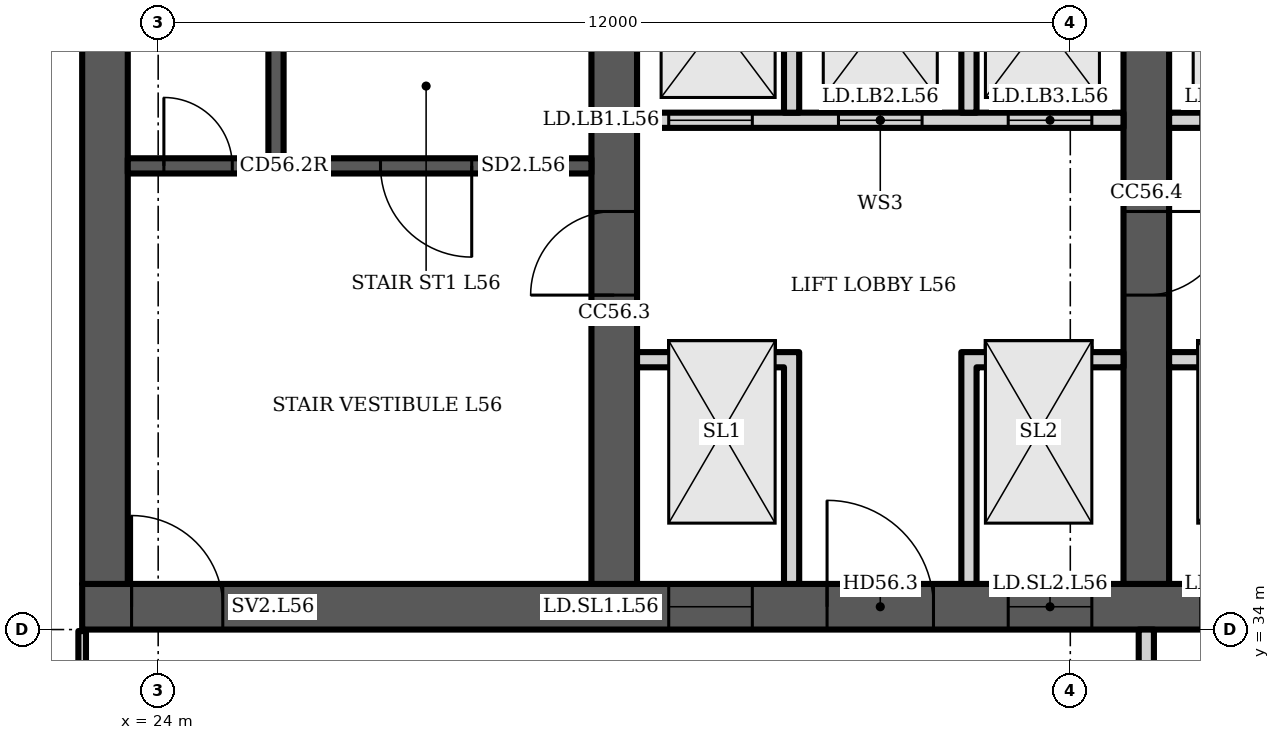
"""IFC4 building model, lengths in metres.
Left out: names, types, materials, properties, quantities, classifications, styles, units other than length and angle.
Written with IfcOpenShell. Run it as: python <this file> out.ifc"""

import sys

from ifc_helpers import new_model, si_unit, direction, frame, frame_2d, origin, place, context, subcontext, project, spatial, polyline, rectangle, outline, extrude, element, fill, save


model = new_model("IFC4")
c1 = context("Model", 3, precision=1e-05, world=origin(), true_north=direction((0.0, 1.0)))
c2 = subcontext(c1, "Body", "Model", "MODEL_VIEW")
j1 = project(units=[si_unit("LENGTHUNIT", "METRE"), si_unit("PLANEANGLEUNIT", "RADIAN")], contexts=[c1])
p1 = place(None, origin())
s1 = spatial("IfcSite", under=j1, at=p1, CompositionType="ELEMENT")
p2 = place(p1, origin())
s2 = spatial("IfcBuilding", under=s1, at=p2, CompositionType="ELEMENT")
p3 = place(p2, frame((0.0, 0.0, 225.1)))
s3 = spatial("IfcBuildingStorey", under=s2, at=p3, CompositionType="ELEMENT", Elevation=225.1)
p4 = place(p3, frame((23.0, 34.3, 0.0), z_axis=(0.0, 0.0, 1.0), x_axis=(1.0, 0.0, 0.0)))
e1 = element("IfcWall", 1, at=p4, inside=s3, PredefinedType="SHEAR", context=c2, shape_type="SweptSolid", body=[
    extrude(rectangle(XDim=35.0, YDim=0.6, at=frame_2d((17.5, 0.0))), origin(), (0.0, 0.0, 1.0), 3.6),
])
p5 = place(p4, frame((0.65, 0.0, 0.0)))
e2 = element("IfcOpeningElement", 2, at=p5, cuts=e1, PredefinedType="OPENING", context=c2, shape_type="SweptSolid", body=[
    extrude(rectangle(XDim=1.2, YDim=2.1, at=frame_2d((0.6, 1.05))), frame((0.0, 0.31, 0.0), z_axis=(0.0, -1.0, 0.0), x_axis=(1.0, 0.0, 0.0)), (0.0, 0.0, 1.0), 0.62),
])
p6 = place(p4, frame((7.717, 0.0, 0.0)))
e3 = element("IfcOpeningElement", 3, at=p6, cuts=e1, PredefinedType="OPENING", context=c2, shape_type="SweptSolid", body=[
    extrude(rectangle(XDim=1.1, YDim=2.1, at=frame_2d((0.55, 1.05))), frame((0.0, 0.31, 0.0), z_axis=(0.0, -1.0, 0.0), x_axis=(1.0, 0.0, 0.0)), (0.0, 0.0, 1.0), 0.62),
])
p7 = place(p4, frame((12.183, 0.0, 0.0)))
e4 = element("IfcOpeningElement", 4, at=p7, cuts=e1, PredefinedType="OPENING", context=c2, shape_type="SweptSolid", body=[
    extrude(rectangle(XDim=1.1, YDim=2.1, at=frame_2d((0.55, 1.05))), frame((0.0, 0.31, 0.0), z_axis=(0.0, -1.0, 0.0), x_axis=(1.0, 0.0, 0.0)), (0.0, 0.0, 1.0), 0.62),
])
p8 = place(p4, frame((9.8, 0.0, 0.0)))
e5 = element("IfcOpeningElement", 5, at=p8, cuts=e1, PredefinedType="OPENING", context=c2, shape_type="SweptSolid", body=[
    extrude(rectangle(XDim=1.4, YDim=2.1, at=frame_2d((0.7, 1.05))), frame((0.0, 0.31, 0.0), z_axis=(0.0, -1.0, 0.0), x_axis=(1.0, 0.0, 0.0)), (0.0, 0.0, 1.0), 0.62),
])
p9 = place(p4, frame((14.717, 0.0, 0.0)))
e6 = element("IfcOpeningElement", 6, at=p9, cuts=e1, PredefinedType="OPENING", context=c2, shape_type="SweptSolid", body=[
    extrude(rectangle(XDim=1.1, YDim=2.1, at=frame_2d((0.55, 1.05))), frame((0.0, 0.31, 0.0), z_axis=(0.0, -1.0, 0.0), x_axis=(1.0, 0.0, 0.0)), (0.0, 0.0, 1.0), 0.62),
])
p10 = place(p4, frame((16.95, 0.0, 0.0)))
e7 = element("IfcOpeningElement", 7, at=p10, cuts=e1, PredefinedType="OPENING", context=c2, shape_type="SweptSolid", body=[
    extrude(rectangle(XDim=1.1, YDim=2.1, at=frame_2d((0.55, 1.05))), frame((0.0, 0.31, 0.0), z_axis=(0.0, -1.0, 0.0), x_axis=(1.0, 0.0, 0.0)), (0.0, 0.0, 1.0), 0.62),
])
p11 = place(p4, frame((19.183, 0.0, 0.0)))
e8 = element("IfcOpeningElement", 8, at=p11, cuts=e1, PredefinedType="OPENING", context=c2, shape_type="SweptSolid", body=[
    extrude(rectangle(XDim=1.1, YDim=2.1, at=frame_2d((0.55, 1.05))), frame((0.0, 0.31, 0.0), z_axis=(0.0, -1.0, 0.0), x_axis=(1.0, 0.0, 0.0)), (0.0, 0.0, 1.0), 0.62),
])
p12 = place(p4, frame((26.15, 0.0, 0.0)))
e9 = element("IfcOpeningElement", 9, at=p12, cuts=e1, PredefinedType="OPENING", context=c2, shape_type="SweptSolid", body=[
    extrude(rectangle(XDim=1.2, YDim=2.1, at=frame_2d((0.6, 1.05))), frame((0.0, 0.31, 0.0), z_axis=(0.0, -1.0, 0.0), x_axis=(1.0, 0.0, 0.0)), (0.0, 0.0, 1.0), 0.62),
])
p13 = place(p4, frame((30.8, 0.0, 0.0)))
e10 = element("IfcOpeningElement", 10, at=p13, cuts=e1, PredefinedType="OPENING", context=c2, shape_type="SweptSolid", body=[
    extrude(rectangle(XDim=1.4, YDim=2.1, at=frame_2d((0.7, 1.05))), frame((0.0, 0.31, 0.0), z_axis=(0.0, -1.0, 0.0), x_axis=(1.0, 0.0, 0.0)), (0.0, 0.0, 1.0), 0.62),
])
p14 = place(p3, frame((23.3, 34.6, 0.0), z_axis=(0.0, 0.0, 1.0), x_axis=(0.0, 1.0, 0.0)))
e11 = element("IfcWall", 11, at=p14, inside=s3, PredefinedType="SHEAR", context=c2, shape_type="SweptSolid", body=[
    extrude(rectangle(XDim=13.585, YDim=0.6, at=frame_2d((6.792, 0.0))), origin(), (0.0, 0.0, 1.0), 3.6),
])
p15 = place(p3, frame((30.0, 34.6, 0.0), z_axis=(0.0, 0.0, 1.0), x_axis=(0.0, 1.0, 0.0)))
e12 = element("IfcWall", 12, at=p15, inside=s3, PredefinedType="SHEAR", context=c2, shape_type="SweptSolid", body=[
    extrude(rectangle(XDim=14.171, YDim=0.6, at=frame_2d((7.085, 0.0))), origin(), (0.0, 0.0, 1.0), 3.6),
])
p16 = place(p15, frame((3.8, 0.0, 0.0)))
e13 = element("IfcOpeningElement", 13, at=p16, cuts=e12, PredefinedType="OPENING", context=c2, shape_type="SweptSolid", body=[
    extrude(rectangle(XDim=1.1, YDim=2.1, at=frame_2d((0.55, 1.05))), frame((0.0, 0.31, 0.0), z_axis=(0.0, -1.0, 0.0), x_axis=(1.0, 0.0, 0.0)), (0.0, 0.0, 1.0), 0.62),
])
p17 = place(p3, frame((37.0, 34.6, 0.0), z_axis=(0.0, 0.0, 1.0), x_axis=(0.0, 1.0, 0.0)))
e14 = element("IfcWall", 14, at=p17, inside=s3, PredefinedType="SHEAR", context=c2, shape_type="SweptSolid", body=[
    extrude(rectangle(XDim=14.784, YDim=0.6, at=frame_2d((7.392, 0.0))), origin(), (0.0, 0.0, 1.0), 3.6),
])
p18 = place(p17, frame((11.302, 0.0, 0.0)))
e15 = element("IfcOpeningElement", 15, at=p18, cuts=e14, PredefinedType="OPENING", context=c2, shape_type="SweptSolid", body=[
    extrude(rectangle(XDim=1.0, YDim=2.1, at=frame_2d((0.5, 1.05))), frame((0.0, 0.31, 0.0), z_axis=(0.0, -1.0, 0.0), x_axis=(1.0, 0.0, 0.0)), (0.0, 0.0, 1.0), 0.62),
])
p19 = place(p17, frame((3.8, 0.0, 0.0)))
e16 = element("IfcOpeningElement", 16, at=p19, cuts=e14, PredefinedType="OPENING", context=c2, shape_type="SweptSolid", body=[
    extrude(rectangle(XDim=1.1, YDim=2.1, at=frame_2d((0.55, 1.05))), frame((0.0, 0.31, 0.0), z_axis=(0.0, -1.0, 0.0), x_axis=(1.0, 0.0, 0.0)), (0.0, 0.0, 1.0), 0.62),
])
p20 = place(p3, frame((23.6, 40.1, 0.0), z_axis=(0.0, 0.0, 1.0), x_axis=(1.0, 0.0, 0.0)))
e17 = element("IfcWall", 17, at=p20, inside=s3, PredefinedType="SHEAR", context=c2, shape_type="SweptSolid", body=[
    extrude(rectangle(XDim=6.1, YDim=0.2, at=frame_2d((3.05, 0.0))), origin(), (0.0, 0.0, 1.0), 3.2),
])
p21 = place(p20, frame((3.325, 0.0, 0.0)))
e18 = element("IfcOpeningElement", 18, at=p21, cuts=e17, PredefinedType="OPENING", context=c2, shape_type="SweptSolid", body=[
    extrude(rectangle(XDim=1.2, YDim=2.1, at=frame_2d((0.6, 1.05))), frame((0.0, 0.11, 0.0), z_axis=(0.0, -1.0, 0.0), x_axis=(1.0, 0.0, 0.0)), (0.0, 0.0, 1.0), 0.22),
])
p22 = place(p20, frame((0.475, 0.0, 0.0)))
e19 = element("IfcOpeningElement", 19, at=p22, cuts=e17, PredefinedType="OPENING", context=c2, shape_type="SweptSolid", body=[
    extrude(rectangle(XDim=0.9, YDim=2.1, at=frame_2d((0.45, 1.05))), frame((0.0, 0.11, 0.0), z_axis=(0.0, -1.0, 0.0), x_axis=(1.0, 0.0, 0.0)), (0.0, 0.0, 1.0), 0.22),
])
p23 = place(p3, frame((25.55, 40.2, 0.0), z_axis=(0.0, 0.0, 1.0), x_axis=(0.0, 1.0, 0.0)))
e20 = element("IfcWall", 20, at=p23, inside=s3, PredefinedType="SHEAR", context=c2, shape_type="SweptSolid", body=[
    extrude(rectangle(XDim=7.2, YDim=0.2, at=frame_2d((3.6, 0.0))), origin(), (0.0, 0.0, 1.0), 3.2),
])
p24 = place(p3, frame((30.3, 40.7, 0.0), z_axis=(0.0, 0.0, 1.0), x_axis=(1.0, 0.0, 0.0)))
e21 = element("IfcWall", 21, at=p24, inside=s3, PredefinedType="PARTITIONING", context=c2, shape_type="SweptSolid", body=[
    extrude(rectangle(XDim=6.4, YDim=0.2, at=frame_2d((3.2, 0.0))), origin(), (0.0, 0.0, 1.0), 3.2),
])
p25 = place(p24, frame((0.417, 0.0, 0.0)))
e22 = element("IfcOpeningElement", 22, at=p25, cuts=e21, PredefinedType="OPENING", context=c2, shape_type="SweptSolid", body=[
    extrude(rectangle(XDim=1.1, YDim=2.1, at=frame_2d((0.55, 1.05))), frame((0.0, 0.11, 0.0), z_axis=(0.0, -1.0, 0.0), x_axis=(1.0, 0.0, 0.0)), (0.0, 0.0, 1.0), 0.22),
])
p26 = place(p24, frame((2.65, 0.0, 0.0)))
e23 = element("IfcOpeningElement", 23, at=p26, cuts=e21, PredefinedType="OPENING", context=c2, shape_type="SweptSolid", body=[
    extrude(rectangle(XDim=1.1, YDim=2.1, at=frame_2d((0.55, 1.05))), frame((0.0, 0.11, 0.0), z_axis=(0.0, -1.0, 0.0), x_axis=(1.0, 0.0, 0.0)), (0.0, 0.0, 1.0), 0.22),
])
p27 = place(p24, frame((4.883, 0.0, 0.0)))
e24 = element("IfcOpeningElement", 24, at=p27, cuts=e21, PredefinedType="OPENING", context=c2, shape_type="SweptSolid", body=[
    extrude(rectangle(XDim=1.1, YDim=2.1, at=frame_2d((0.55, 1.05))), frame((0.0, 0.11, 0.0), z_axis=(0.0, -1.0, 0.0), x_axis=(1.0, 0.0, 0.0)), (0.0, 0.0, 1.0), 0.22),
])
p28 = place(p3, frame((0.0, 0.0, -0.0)))
e25 = element("IfcWall", 25, at=p28, inside=s3, PredefinedType="PARTITIONING", context=c2, shape_type="SweptSolid", body=[
    extrude(outline(polyline([(32.233, 37.45), (30.3, 37.45), (30.3, 37.65), (32.233, 37.65), (32.433, 37.65), (32.433, 34.6), (32.233, 34.6), (32.233, 37.45)])), origin(), (0.0, 0.0, 1.0), 3.2),
])
p29 = place(p3, frame((0.0, 0.0, -0.0)))
e26 = element("IfcWall", 26, at=p29, inside=s3, PredefinedType="PARTITIONING", context=c2, shape_type="SweptSolid", body=[
    extrude(outline(polyline([(34.567, 37.65), (34.767, 37.65), (36.7, 37.65), (36.7, 37.45), (34.767, 37.45), (34.767, 34.6), (34.567, 34.6), (34.567, 37.65)])), origin(), (0.0, 0.0, 1.0), 3.2),
])
p30 = place(p3, frame((0.0, 0.0, -0.0)))
e27 = element("IfcWall", 27, at=p30, inside=s3, PredefinedType="PARTITIONING", context=c2, shape_type="SweptSolid", body=[
    extrude(outline(polyline([(32.433, 40.8), (32.233, 40.8), (32.233, 43.8), (30.3, 43.8), (30.3, 44.0), (36.7, 44.0), (36.7, 43.8), (34.767, 43.8), (34.767, 40.8), (34.567, 40.8), (34.567, 43.8), (32.433, 43.8), (32.433, 40.8)])), origin(), (0.0, 0.0, 1.0), 3.2),
])
p31 = place(p3, frame((37.3, 40.7, 0.0), z_axis=(0.0, 0.0, 1.0), x_axis=(1.0, 0.0, 0.0)))
e28 = element("IfcWall", 28, at=p31, inside=s3, PredefinedType="PARTITIONING", context=c2, shape_type="SweptSolid", body=[
    extrude(rectangle(XDim=6.4, YDim=0.2, at=frame_2d((3.2, 0.0))), origin(), (0.0, 0.0, 1.0), 3.2),
])
p32 = place(p31, frame((0.417, 0.0, 0.0)))
e29 = element("IfcOpeningElement", 29, at=p32, cuts=e28, PredefinedType="OPENING", context=c2, shape_type="SweptSolid", body=[
    extrude(rectangle(XDim=1.1, YDim=2.1, at=frame_2d((0.55, 1.05))), frame((0.0, 0.11, 0.0), z_axis=(0.0, -1.0, 0.0), x_axis=(1.0, 0.0, 0.0)), (0.0, 0.0, 1.0), 0.22),
])
p33 = place(p31, frame((2.65, 0.0, 0.0)))
e30 = element("IfcOpeningElement", 30, at=p33, cuts=e28, PredefinedType="OPENING", context=c2, shape_type="SweptSolid", body=[
    extrude(rectangle(XDim=1.1, YDim=2.1, at=frame_2d((0.55, 1.05))), frame((0.0, 0.11, 0.0), z_axis=(0.0, -1.0, 0.0), x_axis=(1.0, 0.0, 0.0)), (0.0, 0.0, 1.0), 0.22),
])
p34 = place(p31, frame((4.883, 0.0, 0.0)))
e31 = element("IfcOpeningElement", 31, at=p34, cuts=e28, PredefinedType="OPENING", context=c2, shape_type="SweptSolid", body=[
    extrude(rectangle(XDim=1.1, YDim=2.1, at=frame_2d((0.55, 1.05))), frame((0.0, 0.11, 0.0), z_axis=(0.0, -1.0, 0.0), x_axis=(1.0, 0.0, 0.0)), (0.0, 0.0, 1.0), 0.22),
])
p35 = place(p3, frame((0.0, 0.0, -0.0)))
e32 = element("IfcWall", 32, at=p35, inside=s3, PredefinedType="PARTITIONING", context=c2, shape_type="SweptSolid", body=[
    extrude(outline(polyline([(41.567, 37.1), (39.433, 37.1), (39.433, 34.6), (39.233, 34.6), (39.233, 37.45), (37.3, 37.45), (37.3, 37.65), (39.233, 37.65), (39.433, 37.65), (39.433, 37.3), (41.567, 37.3), (41.567, 37.35), (41.767, 37.35), (43.7, 37.35), (43.7, 37.15), (41.767, 37.15), (41.767, 34.6), (41.567, 34.6), (41.567, 37.1)])), origin(), (0.0, 0.0, 1.0), 3.2),
])
p36 = place(p3, frame((0.0, 0.0, -0.0)))
e33 = element("IfcWall", 33, at=p36, inside=s3, PredefinedType="PARTITIONING", context=c2, shape_type="SweptSolid", body=[
    extrude(outline(polyline([(39.433, 40.8), (39.233, 40.8), (39.233, 43.8), (37.3, 43.8), (37.3, 44.0), (43.7, 44.0), (43.7, 43.8), (41.767, 43.8), (41.767, 40.8), (41.567, 40.8), (41.567, 43.8), (39.433, 43.8), (39.433, 40.8)])), origin(), (0.0, 0.0, 1.0), 3.2),
])
p37 = place(p3, frame((37.0, 30.5, 0.0), z_axis=(0.0, 0.0, 1.0), x_axis=(0.0, 1.0, 0.0)))
e34 = element("IfcWall", 34, at=p37, inside=s3, PredefinedType="PARTITIONING", context=c2, shape_type="SweptSolid", body=[
    extrude(rectangle(XDim=3.5, YDim=0.2, at=frame_2d((1.75, 0.0))), origin(), (0.0, 0.0, 1.0), 3.2),
])
p38 = place(p37, frame((1.2, 0.0, 0.0)))
e35 = element("IfcOpeningElement", 35, at=p38, cuts=e34, PredefinedType="OPENING", context=c2, shape_type="SweptSolid", body=[
    extrude(rectangle(XDim=1.1, YDim=2.1, at=frame_2d((0.55, 1.05))), frame((0.0, 0.11, 0.0), z_axis=(0.0, -1.0, 0.0), x_axis=(1.0, 0.0, 0.0)), (0.0, 0.0, 1.0), 0.22),
])
p39 = place(p3, frame((23.0, 24.275, 0.0), z_axis=(0.0, 0.0, 1.0), x_axis=(0.0, 1.0, 0.0)))
e36 = element("IfcWall", 36, at=p39, inside=s3, PredefinedType="PARTITIONING", context=c2, shape_type="SweptSolid", body=[
    extrude(rectangle(XDim=9.705, YDim=0.1, at=frame_2d((4.853, 0.0))), origin(), (0.0, 0.0, 1.0), 3.2),
])
p40 = place(p39, frame((5.105, 0.0, 0.0)))
e37 = element("IfcOpeningElement", 37, at=p40, cuts=e36, PredefinedType="OPENING", context=c2, shape_type="SweptSolid", body=[
    extrude(rectangle(XDim=1.0, YDim=2.1, at=frame_2d((0.5, 1.05))), frame((0.0, 0.06, 0.0), z_axis=(0.0, -1.0, 0.0), x_axis=(1.0, 0.0, 0.0)), (0.0, 0.0, 1.0), 0.12),
])
p41 = place(p21, origin())
e38 = element("IfcDoor", 38, at=p41, inside=s3, OperationType="SINGLE_SWING_RIGHT", PredefinedType="DOOR", context=c2, shape_type="SweptSolid", body=[
    extrude(rectangle(XDim=1.2, YDim=2.1, at=frame_2d((0.6, 1.05))), frame((0.0, 0.025, 0.0), z_axis=(0.0, -1.0, 0.0), x_axis=(1.0, 0.0, 0.0)), (0.0, 0.0, 1.0), 0.05),
])
fill(e18, e38)
p42 = place(p22, origin())
e39 = element("IfcDoor", 39, at=p42, inside=s3, OperationType="SINGLE_SWING_LEFT", PredefinedType="DOOR", context=c2, shape_type="SweptSolid", body=[
    extrude(rectangle(XDim=0.9, YDim=2.1, at=frame_2d((0.45, 1.05))), frame((0.0, 0.025, 0.0), z_axis=(0.0, -1.0, 0.0), x_axis=(1.0, 0.0, 0.0)), (0.0, 0.0, 1.0), 0.05),
])
fill(e19, e39)
p43 = place(p5, origin())
e40 = element("IfcDoor", 40, at=p43, inside=s3, OperationType="SINGLE_SWING_LEFT", PredefinedType="DOOR", context=c2, shape_type="SweptSolid", body=[
    extrude(rectangle(XDim=1.2, YDim=2.1, at=frame_2d((0.6, 1.05))), frame((0.0, 0.025, 0.0), z_axis=(0.0, -1.0, 0.0), x_axis=(1.0, 0.0, 0.0)), (0.0, 0.0, 1.0), 0.05),
])
fill(e2, e40)
p44 = place(p6, origin())
e41 = element("IfcDoor", 41, at=p44, inside=s3, OperationType="DOUBLE_DOOR_SLIDING", PredefinedType="DOOR", context=c2, shape_type="SweptSolid", body=[
    extrude(rectangle(XDim=1.1, YDim=2.1, at=frame_2d((0.55, 1.05))), frame((0.0, 0.025, 0.0), z_axis=(0.0, -1.0, 0.0), x_axis=(1.0, 0.0, 0.0)), (0.0, 0.0, 1.0), 0.05),
])
fill(e3, e41)
p45 = place(p7, origin())
e42 = element("IfcDoor", 42, at=p45, inside=s3, OperationType="DOUBLE_DOOR_SLIDING", PredefinedType="DOOR", context=c2, shape_type="SweptSolid", body=[
    extrude(rectangle(XDim=1.1, YDim=2.1, at=frame_2d((0.55, 1.05))), frame((0.0, 0.025, 0.0), z_axis=(0.0, -1.0, 0.0), x_axis=(1.0, 0.0, 0.0)), (0.0, 0.0, 1.0), 0.05),
])
fill(e4, e42)
p46 = place(p8, origin())
e43 = element("IfcDoor", 43, at=p46, inside=s3, OperationType="DOUBLE_DOOR_SINGLE_SWING", PredefinedType="DOOR", context=c2, shape_type="SweptSolid", body=[
    extrude(rectangle(XDim=1.4, YDim=2.1, at=frame_2d((0.7, 1.05))), frame((0.0, 0.025, 0.0), z_axis=(0.0, -1.0, 0.0), x_axis=(1.0, 0.0, 0.0)), (0.0, 0.0, 1.0), 0.05),
])
fill(e5, e43)
p47 = place(p25, origin())
e44 = element("IfcDoor", 44, at=p47, inside=s3, OperationType="DOUBLE_DOOR_SLIDING", PredefinedType="DOOR", context=c2, shape_type="SweptSolid", body=[
    extrude(rectangle(XDim=1.1, YDim=2.1, at=frame_2d((0.55, 1.05))), frame((0.0, 0.025, 0.0), z_axis=(0.0, -1.0, 0.0), x_axis=(1.0, 0.0, 0.0)), (0.0, 0.0, 1.0), 0.05),
])
fill(e22, e44)
p48 = place(p26, origin())
e45 = element("IfcDoor", 45, at=p48, inside=s3, OperationType="DOUBLE_DOOR_SLIDING", PredefinedType="DOOR", context=c2, shape_type="SweptSolid", body=[
    extrude(rectangle(XDim=1.1, YDim=2.1, at=frame_2d((0.55, 1.05))), frame((0.0, 0.025, 0.0), z_axis=(0.0, -1.0, 0.0), x_axis=(1.0, 0.0, 0.0)), (0.0, 0.0, 1.0), 0.05),
])
fill(e23, e45)
p49 = place(p27, origin())
e46 = element("IfcDoor", 46, at=p49, inside=s3, OperationType="DOUBLE_DOOR_SLIDING", PredefinedType="DOOR", context=c2, shape_type="SweptSolid", body=[
    extrude(rectangle(XDim=1.1, YDim=2.1, at=frame_2d((0.55, 1.05))), frame((0.0, 0.025, 0.0), z_axis=(0.0, -1.0, 0.0), x_axis=(1.0, 0.0, 0.0)), (0.0, 0.0, 1.0), 0.05),
])
fill(e24, e46)
p50 = place(p16, origin())
e47 = element("IfcDoor", 47, at=p50, inside=s3, OperationType="SINGLE_SWING_LEFT", PredefinedType="DOOR", context=c2, shape_type="SweptSolid", body=[
    extrude(rectangle(XDim=1.1, YDim=2.1, at=frame_2d((0.55, 1.05))), frame((0.0, 0.025, 0.0), z_axis=(0.0, -1.0, 0.0), x_axis=(1.0, 0.0, 0.0)), (0.0, 0.0, 1.0), 0.05),
])
fill(e13, e47)
p51 = place(p19, origin())
e48 = element("IfcDoor", 48, at=p51, inside=s3, OperationType="SINGLE_SWING_RIGHT", PredefinedType="DOOR", context=c2, shape_type="SweptSolid", body=[
    extrude(rectangle(XDim=1.1, YDim=2.1, at=frame_2d((0.55, 1.05))), frame((0.0, 0.025, 0.0), z_axis=(0.0, -1.0, 0.0), x_axis=(1.0, 0.0, 0.0)), (0.0, 0.0, 1.0), 0.05),
])
fill(e16, e48)
save(model, sys.argv[1])
